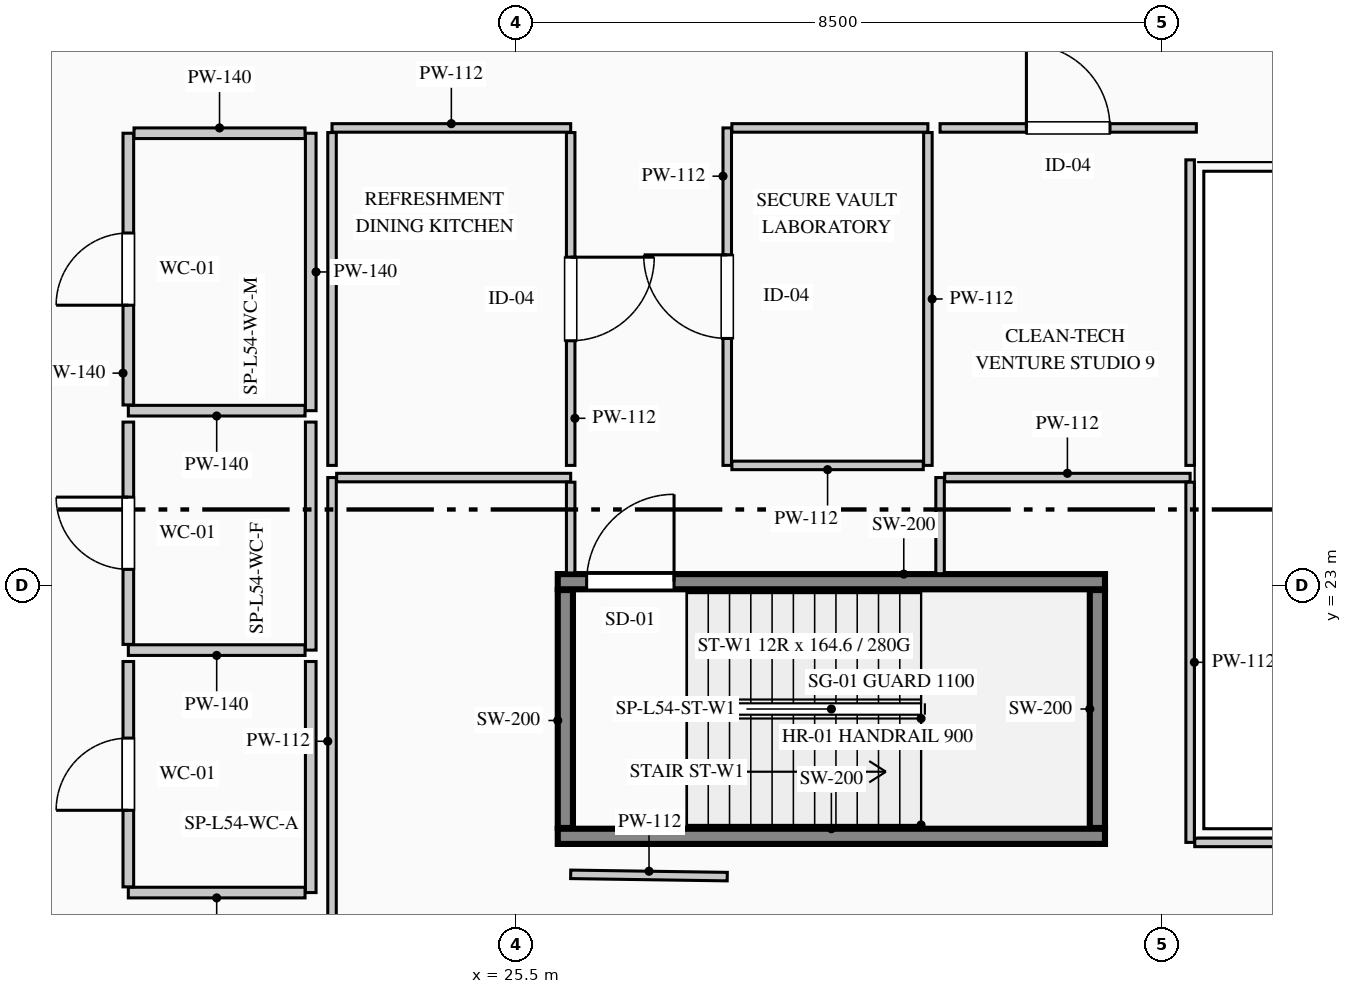
"""IFC4 building model, lengths in metres.
Left out: names, types, materials, properties, quantities, classifications, styles, units other than length and angle.
Written with IfcOpenShell. Run it as: python <this file> out.ifc"""

import sys

from ifc_helpers import new_model, si_unit, direction, frame, frame_2d, origin, place, context, subcontext, project, spatial, rectangle, extrude, element, fill, save


model = new_model("IFC4")
c1 = context("Model", 3, precision=1e-05, world=origin(), true_north=direction((0.0, 1.0)))
c2 = subcontext(c1, "Body", "Model", "MODEL_VIEW")
j1 = project(units=[si_unit("LENGTHUNIT", "METRE"), si_unit("PLANEANGLEUNIT", "RADIAN")], contexts=[c1])
p1 = place(None, origin())
s1 = spatial("IfcSite", under=j1, at=p1, CompositionType="ELEMENT")
p2 = place(p1, origin())
s2 = spatial("IfcBuilding", under=s1, at=p2, CompositionType="ELEMENT")
p3 = place(p2, frame((0.0, 0.0, 227.2)))
s3 = spatial("IfcBuildingStorey", under=s2, at=p3, CompositionType="ELEMENT", Elevation=227.2)
p4 = place(p3, frame((26.05, 19.7, 0.0), z_axis=(0.0, 0.0, 1.0), x_axis=(1.0, 0.0, 0.0)))
e1 = element("IfcWall", 1, at=p4, inside=s3, PredefinedType="SHEAR", context=c2, shape_type="SweptSolid", body=[
    extrude(rectangle(XDim=7.2, YDim=0.2, at=frame_2d((3.6, 0.0))), origin(), (0.0, 0.0, 1.0), 3.95),
])
p5 = place(p3, frame((26.05, 23.05, 0.0), z_axis=(0.0, 0.0, 1.0), x_axis=(1.0, 0.0, 0.0)))
e2 = element("IfcWall", 2, at=p5, inside=s3, PredefinedType="SHEAR", context=c2, shape_type="SweptSolid", body=[
    extrude(rectangle(XDim=7.2, YDim=0.2, at=frame_2d((3.6, 0.0))), origin(), (0.0, 0.0, 1.0), 3.95),
])
p6 = place(p5, frame((0.38, 0.0, 0.0)))
e3 = element("IfcOpeningElement", 3, at=p6, cuts=e2, PredefinedType="OPENING", context=c2, shape_type="SweptSolid", body=[
    extrude(rectangle(XDim=1.15, YDim=2.2, at=frame_2d((0.575, 1.1))), frame((0.0, 0.11, 0.0), z_axis=(0.0, -1.0, 0.0), x_axis=(1.0, 0.0, 0.0)), (0.0, 0.0, 1.0), 0.22),
])
for number, where, z_axis, x_axis in (
    (4, (26.15, 19.81, 0.0), (0.0, 0.0, 1.0), (0.0, 1.0, 0.0)),
    (5, (33.15, 19.81, 0.0), (0.0, 0.0, 1.0), (0.0, 1.0, 0.0)),
):
    element("IfcWall", number, at=place(p3, frame(where, z_axis=z_axis, x_axis=x_axis)), inside=s3, PredefinedType="SHEAR", context=c2, shape_type="SweptSolid", body=[
        extrude(rectangle(XDim=3.13, YDim=0.2, at=frame_2d((1.565, 0.0))), origin(), (0.0, 0.0, 1.0), 3.95),
    ])
p7 = place(p3, frame((22.8, 28.95, 0.0), z_axis=(0.0, 0.0, 1.0), x_axis=(0.0, -1.0, 0.0)))
e6 = element("IfcWall", 6, at=p7, inside=s3, PredefinedType="PARTITIONING", context=c2, shape_type="SweptSolid", body=[
    extrude(rectangle(XDim=3.65, YDim=0.14, at=frame_2d((1.825, 0.0))), origin(), (0.0, 0.0, 1.0), 3.385),
])
p8 = place(p3, frame((22.725, 25.3, 0.0), z_axis=(0.0, 0.0, 1.0), x_axis=(-1.0, 0.0, 0.0)))
e7 = element("IfcWall", 7, at=p8, inside=s3, PredefinedType="PARTITIONING", context=c2, shape_type="SweptSolid", body=[
    extrude(rectangle(XDim=2.325, YDim=0.14, at=frame_2d((1.163, 0.0))), origin(), (0.0, 0.0, 1.0), 3.7),
])
p9 = place(p3, frame((20.4, 25.375, 0.0), z_axis=(0.0, 0.0, 1.0), x_axis=(0.0, 1.0, 0.0)))
e8 = element("IfcWall", 8, at=p9, inside=s3, PredefinedType="PARTITIONING", context=c2, shape_type="SweptSolid", body=[
    extrude(rectangle(XDim=3.575, YDim=0.14, at=frame_2d((1.788, 0.0))), origin(), (0.0, 0.0, 1.0), 3.7),
])
p10 = place(p9, frame((1.312, 0.0, 0.0)))
e9 = element("IfcOpeningElement", 9, at=p10, cuts=e8, PredefinedType="OPENING", context=c2, shape_type="SweptSolid", body=[
    extrude(rectangle(XDim=0.95, YDim=2.15, at=frame_2d((0.475, 1.075))), frame((0.0, 0.08, 0.0), z_axis=(0.0, -1.0, 0.0), x_axis=(1.0, 0.0, 0.0)), (0.0, 0.0, 1.0), 0.16),
])
p11 = place(p3, frame((20.475, 28.95, 0.0), z_axis=(0.0, 0.0, 1.0), x_axis=(1.0, 0.0, 0.0)))
e10 = element("IfcWall", 10, at=p11, inside=s3, PredefinedType="PARTITIONING", context=c2, shape_type="SweptSolid", body=[
    extrude(rectangle(XDim=2.25, YDim=0.14, at=frame_2d((1.125, 0.0))), origin(), (0.0, 0.0, 1.0), 3.7),
])
p12 = place(p3, frame((22.8, 25.15, 0.0), z_axis=(0.0, 0.0, 1.0), x_axis=(0.0, -1.0, 0.0)))
e11 = element("IfcWall", 11, at=p12, inside=s3, PredefinedType="PARTITIONING", context=c2, shape_type="SweptSolid", body=[
    extrude(rectangle(XDim=3.0, YDim=0.14, at=frame_2d((1.5, 0.0))), origin(), (0.0, 0.0, 1.0), 3.385),
])
p13 = place(p3, frame((22.725, 22.15, 0.0), z_axis=(0.0, 0.0, 1.0), x_axis=(-1.0, 0.0, 0.0)))
e12 = element("IfcWall", 12, at=p13, inside=s3, PredefinedType="PARTITIONING", context=c2, shape_type="SweptSolid", body=[
    extrude(rectangle(XDim=2.325, YDim=0.14, at=frame_2d((1.163, 0.0))), origin(), (0.0, 0.0, 1.0), 3.7),
])
p14 = place(p3, frame((20.4, 22.225, 0.0), z_axis=(0.0, 0.0, 1.0), x_axis=(0.0, 1.0, 0.0)))
e13 = element("IfcWall", 13, at=p14, inside=s3, PredefinedType="PARTITIONING", context=c2, shape_type="SweptSolid", body=[
    extrude(rectangle(XDim=2.925, YDim=0.14, at=frame_2d((1.462, 0.0))), origin(), (0.0, 0.0, 1.0), 3.7),
])
p15 = place(p14, frame((0.988, 0.0, 0.0)))
e14 = element("IfcOpeningElement", 14, at=p15, cuts=e13, PredefinedType="OPENING", context=c2, shape_type="SweptSolid", body=[
    extrude(rectangle(XDim=0.95, YDim=2.15, at=frame_2d((0.475, 1.075))), frame((0.0, 0.08, 0.0), z_axis=(0.0, -1.0, 0.0), x_axis=(1.0, 0.0, 0.0)), (0.0, 0.0, 1.0), 0.16),
])
p16 = place(p3, frame((22.8, 22.0, 0.0), z_axis=(0.0, 0.0, 1.0), x_axis=(0.0, -1.0, 0.0)))
e15 = element("IfcWall", 15, at=p16, inside=s3, PredefinedType="PARTITIONING", context=c2, shape_type="SweptSolid", body=[
    extrude(rectangle(XDim=3.04, YDim=0.14, at=frame_2d((1.52, 0.0))), origin(), (0.0, 0.0, 1.0), 3.385),
])
p17 = place(p3, frame((22.725, 18.96, 0.0), z_axis=(0.0, 0.0, 1.0), x_axis=(-1.0, 0.0, 0.0)))
e16 = element("IfcWall", 16, at=p17, inside=s3, PredefinedType="PARTITIONING", context=c2, shape_type="SweptSolid", body=[
    extrude(rectangle(XDim=2.325, YDim=0.14, at=frame_2d((1.163, 0.0))), origin(), (0.0, 0.0, 1.0), 3.7),
])
p18 = place(p3, frame((20.4, 19.035, 0.0), z_axis=(0.0, 0.0, 1.0), x_axis=(0.0, 1.0, 0.0)))
e17 = element("IfcWall", 17, at=p18, inside=s3, PredefinedType="PARTITIONING", context=c2, shape_type="SweptSolid", body=[
    extrude(rectangle(XDim=2.965, YDim=0.14, at=frame_2d((1.482, 0.0))), origin(), (0.0, 0.0, 1.0), 3.7),
])
p19 = place(p18, frame((1.008, 0.0, 0.0)))
e18 = element("IfcOpeningElement", 18, at=p19, cuts=e17, PredefinedType="OPENING", context=c2, shape_type="SweptSolid", body=[
    extrude(rectangle(XDim=0.95, YDim=2.15, at=frame_2d((0.475, 1.075))), frame((0.0, 0.08, 0.0), z_axis=(0.0, -1.0, 0.0), x_axis=(1.0, 0.0, 0.0)), (0.0, 0.0, 1.0), 0.16),
])
p20 = place(p3, frame((31.08, 23.155, 0.0), z_axis=(0.0, 0.0, 1.0), x_axis=(0.0, 1.0, 0.0)))
e19 = element("IfcWall", 19, at=p20, inside=s3, PredefinedType="PARTITIONING", context=c2, shape_type="SweptSolid", body=[
    extrude(rectangle(XDim=1.265, YDim=0.112, at=frame_2d((0.632, 0.0))), origin(), (0.0, 0.0, 1.0), 3.7),
])
p21 = place(p3, frame((31.141, 24.42, 0.0), z_axis=(0.0, 0.0, 1.0), x_axis=(1.0, 0.0, 0.0)))
e20 = element("IfcWall", 20, at=p21, inside=s3, PredefinedType="PARTITIONING", context=c2, shape_type="SweptSolid", body=[
    extrude(rectangle(XDim=3.229, YDim=0.112, at=frame_2d((1.615, 0.0))), origin(), (0.0, 0.0, 1.0), 3.385),
])
p22 = place(p3, frame((34.37, 24.359, 0.0), z_axis=(0.0, 0.0, 1.0), x_axis=(0.0, -1.0, 0.0)))
e21 = element("IfcWall", 21, at=p22, inside=s3, PredefinedType="PARTITIONING", context=c2, shape_type="SweptSolid", body=[
    extrude(rectangle(XDim=4.739, YDim=0.112, at=frame_2d((2.369, 0.0))), origin(), (0.0, 0.0, 1.0), 3.7),
])
p23 = place(p3, frame((34.431, 19.62, 0.0), z_axis=(0.0, 0.0, 1.0), x_axis=(1.0, 0.0, 0.0)))
e22 = element("IfcWall", 22, at=p23, inside=s3, PredefinedType="PARTITIONING", context=c2, shape_type="SweptSolid", body=[
    extrude(rectangle(XDim=4.989, YDim=0.112, at=frame_2d((2.495, 0.0))), origin(), (0.0, 0.0, 1.0), 3.7),
])
p24 = place(p3, frame((23.08, 17.481, 0.0), z_axis=(0.0, 0.0, 1.0), x_axis=(0.0, 1.0, 0.0)))
e23 = element("IfcWall", 23, at=p24, inside=s3, PredefinedType="PARTITIONING", context=c2, shape_type="SweptSolid", body=[
    extrude(rectangle(XDim=6.939, YDim=0.112, at=frame_2d((3.469, 0.0))), origin(), (0.0, 0.0, 1.0), 3.385),
])
p25 = place(p3, frame((23.141, 24.42, 0.0), z_axis=(0.0, 0.0, 1.0), x_axis=(1.0, 0.0, 0.0)))
e24 = element("IfcWall", 24, at=p25, inside=s3, PredefinedType="PARTITIONING", context=c2, shape_type="SweptSolid", body=[
    extrude(rectangle(XDim=3.079, YDim=0.112, at=frame_2d((1.54, 0.0))), origin(), (0.0, 0.0, 1.0), 3.385),
])
p26 = place(p3, frame((26.22, 24.359, 0.0), z_axis=(0.0, 0.0, 1.0), x_axis=(0.0, -1.0, 0.0)))
e25 = element("IfcWall", 25, at=p26, inside=s3, PredefinedType="PARTITIONING", context=c2, shape_type="SweptSolid", body=[
    extrude(rectangle(XDim=1.194, YDim=0.112, at=frame_2d((0.597, 0.0))), origin(), (0.0, 0.0, 1.0), 3.7),
])
p27 = place(p3, frame((26.22, 19.2, 0.0), z_axis=(0.0, 0.0, 1.0), x_axis=(0.999893773718, -0.014575365509, 0.0)))
e26 = element("IfcWall", 26, at=p27, inside=s3, PredefinedType="PARTITIONING", context=c2, shape_type="SweptSolid", body=[
    extrude(rectangle(XDim=2.06, YDim=0.112, at=frame_2d((1.03, 0.0))), origin(), (0.0, 0.0, 1.0), 3.385),
])
p28 = place(p3, frame((23.08, 29.02, 0.0), z_axis=(0.0, 0.0, 1.0), x_axis=(1.0, 0.0, 0.0)))
e27 = element("IfcWall", 27, at=p28, inside=s3, PredefinedType="PARTITIONING", context=c2, shape_type="SweptSolid", body=[
    extrude(rectangle(XDim=3.14, YDim=0.112, at=frame_2d((1.57, 0.0))), origin(), (0.0, 0.0, 1.0), 3.385),
])
p29 = place(p3, frame((26.22, 28.959, 0.0), z_axis=(0.0, 0.0, 1.0), x_axis=(0.0, -1.0, 0.0)))
e28 = element("IfcWall", 28, at=p29, inside=s3, PredefinedType="PARTITIONING", context=c2, shape_type="SweptSolid", body=[
    extrude(rectangle(XDim=4.379, YDim=0.112, at=frame_2d((2.189, 0.0))), origin(), (0.0, 0.0, 1.0), 3.7),
])
p30 = place(p29, frame((1.639, 0.0, 0.0)))
e29 = element("IfcOpeningElement", 29, at=p30, cuts=e28, PredefinedType="OPENING", context=c2, shape_type="SweptSolid", body=[
    extrude(rectangle(XDim=1.1, YDim=2.2, at=frame_2d((0.55, 1.1))), frame((0.0, 0.066, 0.0), z_axis=(0.0, -1.0, 0.0), x_axis=(1.0, 0.0, 0.0)), (0.0, 0.0, 1.0), 0.132),
])
p31 = place(p3, frame((23.08, 24.58, 0.0), z_axis=(0.0, 0.0, 1.0), x_axis=(0.0, 1.0, 0.0)))
e30 = element("IfcWall", 30, at=p31, inside=s3, PredefinedType="PARTITIONING", context=c2, shape_type="SweptSolid", body=[
    extrude(rectangle(XDim=4.379, YDim=0.112, at=frame_2d((2.189, 0.0))), origin(), (0.0, 0.0, 1.0), 3.385),
])
p32 = place(p3, frame((28.28, 24.58, 0.0), z_axis=(0.0, 0.0, 1.0), x_axis=(0.0, 1.0, 0.0)))
e31 = element("IfcWall", 31, at=p32, inside=s3, PredefinedType="PARTITIONING", context=c2, shape_type="SweptSolid", body=[
    extrude(rectangle(XDim=4.44, YDim=0.112, at=frame_2d((2.22, 0.0))), origin(), (0.0, 0.0, 1.0), 3.7),
])
p33 = place(p32, frame((1.67, 0.0, 0.0)))
e32 = element("IfcOpeningElement", 32, at=p33, cuts=e31, PredefinedType="OPENING", context=c2, shape_type="SweptSolid", body=[
    extrude(rectangle(XDim=1.1, YDim=2.2, at=frame_2d((0.55, 1.1))), frame((0.0, 0.066, 0.0), z_axis=(0.0, -1.0, 0.0), x_axis=(1.0, 0.0, 0.0)), (0.0, 0.0, 1.0), 0.132),
])
p34 = place(p3, frame((28.341, 29.02, 0.0), z_axis=(0.0, 0.0, 1.0), x_axis=(1.0, 0.0, 0.0)))
e33 = element("IfcWall", 33, at=p34, inside=s3, PredefinedType="PARTITIONING", context=c2, shape_type="SweptSolid", body=[
    extrude(rectangle(XDim=2.579, YDim=0.112, at=frame_2d((1.29, 0.0))), origin(), (0.0, 0.0, 1.0), 3.385),
])
p35 = place(p3, frame((30.92, 28.959, 0.0), z_axis=(0.0, 0.0, 1.0), x_axis=(0.0, -1.0, 0.0)))
e34 = element("IfcWall", 34, at=p35, inside=s3, PredefinedType="PARTITIONING", context=c2, shape_type="SweptSolid", body=[
    extrude(rectangle(XDim=4.379, YDim=0.112, at=frame_2d((2.189, 0.0))), origin(), (0.0, 0.0, 1.0), 3.7),
])
p36 = place(p3, frame((30.859, 24.58, 0.0), z_axis=(0.0, 0.0, 1.0), x_axis=(-1.0, 0.0, 0.0)))
e35 = element("IfcWall", 35, at=p36, inside=s3, PredefinedType="PARTITIONING", context=c2, shape_type="SweptSolid", body=[
    extrude(rectangle(XDim=2.518, YDim=0.112, at=frame_2d((1.259, 0.0))), origin(), (0.0, 0.0, 1.0), 3.485),
])
p37 = place(p3, frame((34.37, 28.6, 0.0), z_axis=(0.0, 0.0, 1.0), x_axis=(0.0, -1.0, 0.0)))
e36 = element("IfcWall", 36, at=p37, inside=s3, PredefinedType="PARTITIONING", context=c2, shape_type="SweptSolid", body=[
    extrude(rectangle(XDim=4.02, YDim=0.112, at=frame_2d((2.01, 0.0))), origin(), (0.0, 0.0, 1.0), 3.7),
])
p38 = place(p3, frame((31.08, 29.02, 0.0), z_axis=(0.0, 0.0, 1.0), x_axis=(1.0, 0.0, 0.0)))
e37 = element("IfcWall", 37, at=p38, inside=s3, PredefinedType="PARTITIONING", context=c2, shape_type="SweptSolid", body=[
    extrude(rectangle(XDim=3.372, YDim=0.112, at=frame_2d((1.686, 0.0))), origin(), (0.0, 0.0, 1.0), 3.385),
])
p39 = place(p38, frame((1.136, 0.0, 0.0)))
e38 = element("IfcOpeningElement", 38, at=p39, cuts=e37, PredefinedType="OPENING", context=c2, shape_type="SweptSolid", body=[
    extrude(rectangle(XDim=1.1, YDim=2.2, at=frame_2d((0.55, 1.1))), frame((0.0, 0.066, 0.0), z_axis=(0.0, -1.0, 0.0), x_axis=(1.0, 0.0, 0.0)), (0.0, 0.0, 1.0), 0.132),
])
p40 = place(p6, origin())
e39 = element("IfcDoor", 39, at=p40, inside=s3, OperationType="SINGLE_SWING_RIGHT", PredefinedType="DOOR", context=c2, shape_type="SweptSolid", body=[
    extrude(rectangle(XDim=1.15, YDim=2.2, at=frame_2d((0.575, 1.1))), frame((0.0, 0.025, 0.0), z_axis=(0.0, -1.0, 0.0), x_axis=(1.0, 0.0, 0.0)), (0.0, 0.0, 1.0), 0.05),
])
fill(e3, e39)
p41 = place(p10, origin())
e40 = element("IfcDoor", 40, at=p41, inside=s3, OperationType="SINGLE_SWING_LEFT", PredefinedType="DOOR", context=c2, shape_type="SweptSolid", body=[
    extrude(rectangle(XDim=0.95, YDim=2.15, at=frame_2d((0.475, 1.075))), frame((0.0, 0.025, 0.0), z_axis=(0.0, -1.0, 0.0), x_axis=(1.0, 0.0, 0.0)), (0.0, 0.0, 1.0), 0.05),
])
fill(e9, e40)
p42 = place(p15, origin())
e41 = element("IfcDoor", 41, at=p42, inside=s3, OperationType="SINGLE_SWING_RIGHT", PredefinedType="DOOR", context=c2, shape_type="SweptSolid", body=[
    extrude(rectangle(XDim=0.95, YDim=2.15, at=frame_2d((0.475, 1.075))), frame((0.0, 0.025, 0.0), z_axis=(0.0, -1.0, 0.0), x_axis=(1.0, 0.0, 0.0)), (0.0, 0.0, 1.0), 0.05),
])
fill(e14, e41)
p43 = place(p19, origin())
e42 = element("IfcDoor", 42, at=p43, inside=s3, OperationType="SINGLE_SWING_LEFT", PredefinedType="DOOR", context=c2, shape_type="SweptSolid", body=[
    extrude(rectangle(XDim=0.95, YDim=2.15, at=frame_2d((0.475, 1.075))), frame((0.0, 0.025, 0.0), z_axis=(0.0, -1.0, 0.0), x_axis=(1.0, 0.0, 0.0)), (0.0, 0.0, 1.0), 0.05),
])
fill(e18, e42)
p44 = place(p30, origin())
e43 = element("IfcDoor", 43, at=p44, inside=s3, OperationType="SINGLE_SWING_LEFT", PredefinedType="DOOR", context=c2, shape_type="SweptSolid", body=[
    extrude(rectangle(XDim=1.1, YDim=2.2, at=frame_2d((0.55, 1.1))), frame((0.0, 0.025, 0.0), z_axis=(0.0, -1.0, 0.0), x_axis=(1.0, 0.0, 0.0)), (0.0, 0.0, 1.0), 0.05),
])
fill(e29, e43)
p45 = place(p33, origin())
e44 = element("IfcDoor", 44, at=p45, inside=s3, OperationType="SINGLE_SWING_RIGHT", PredefinedType="DOOR", context=c2, shape_type="SweptSolid", body=[
    extrude(rectangle(XDim=1.1, YDim=2.2, at=frame_2d((0.55, 1.1))), frame((0.0, 0.025, 0.0), z_axis=(0.0, -1.0, 0.0), x_axis=(1.0, 0.0, 0.0)), (0.0, 0.0, 1.0), 0.05),
])
fill(e32, e44)
p46 = place(p39, origin())
e45 = element("IfcDoor", 45, at=p46, inside=s3, OperationType="SINGLE_SWING_LEFT", PredefinedType="DOOR", context=c2, shape_type="SweptSolid", body=[
    extrude(rectangle(XDim=1.1, YDim=2.2, at=frame_2d((0.55, 1.1))), frame((0.0, 0.025, 0.0), z_axis=(0.0, -1.0, 0.0), x_axis=(1.0, 0.0, 0.0)), (0.0, 0.0, 1.0), 0.05),
])
fill(e38, e45)
save(model, sys.argv[1])
